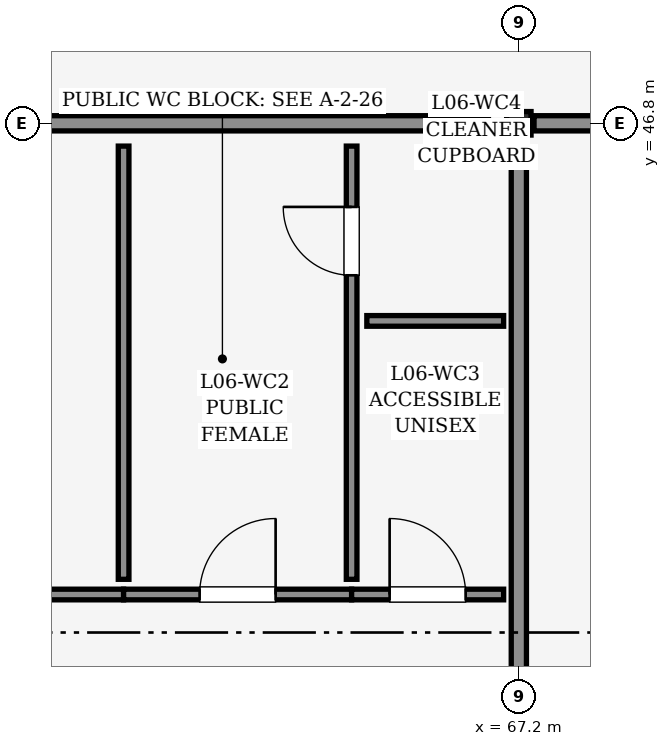
"""IFC4 building model, lengths in metres.
Left out: names, types, materials, properties, quantities, classifications, styles, units other than length and angle.
Written with IfcOpenShell. Run it as: python <this file> out.ifc"""

import sys

from ifc_helpers import new_model, si_unit, direction, frame, frame_2d, origin, origin_2d, place, context, subcontext, project, spatial, rectangle, i_section, extrude, element, fill, save


model = new_model("IFC4")
c1 = context("Model", 3, precision=1e-05, world=origin(), true_north=direction((0.0, 1.0)))
c2 = subcontext(c1, "Body", "Model", "MODEL_VIEW")
j1 = project(units=[si_unit("LENGTHUNIT", "METRE"), si_unit("PLANEANGLEUNIT", "RADIAN")], contexts=[c1])
p1 = place(None, origin())
s1 = spatial("IfcSite", under=j1, at=p1, CompositionType="ELEMENT")
p2 = place(p1, origin())
s2 = spatial("IfcBuilding", under=s1, at=p2, CompositionType="ELEMENT")
p3 = place(p2, frame((0.0, 0.0, 23.4)))
s3 = spatial("IfcBuildingStorey", under=s2, at=p3, CompositionType="ELEMENT", Elevation=23.4)
p4 = place(p3, frame((67.2, 46.8, 0.0), z_axis=(0.0, 0.0, 1.0), x_axis=(1.0, 0.0, 0.0)))
e1 = element("IfcColumn", 1, at=p4, inside=s3, PredefinedType="COLUMN", context=c2, shape_type="SweptSolid", body=[
    extrude(i_section(OverallWidth=0.309, OverallDepth=0.321, WebThickness=0.014, FlangeThickness=0.022, FilletRadius=0.015, at=origin_2d()), origin(), (0.0, 0.0, 1.0), 5.4),
])
p5 = place(p3, frame((59.2, 46.8, 0.0), z_axis=(0.0, 0.0, 1.0), x_axis=(1.0, 0.0, 0.0)))
e2 = element("IfcWall", 2, at=p5, inside=s3, PredefinedType="PARTITIONING", context=c2, shape_type="SweptSolid", body=[
    extrude(rectangle(XDim=7.6, YDim=0.2, at=frame_2d((3.8, 0.0))), origin(), (0.0, 0.0, 1.0), 3.785),
])
p6 = place(p3, frame((67.2, 38.8, 0.0), z_axis=(0.0, 0.0, 1.0), x_axis=(0.0, 1.0, 0.0)))
e3 = element("IfcWall", 3, at=p6, inside=s3, PredefinedType="PARTITIONING", context=c2, shape_type="SweptSolid", body=[
    extrude(rectangle(XDim=7.6, YDim=0.2, at=frame_2d((3.8, 0.0))), origin(), (0.0, 0.0, 1.0), 3.785),
])
p7 = place(p3, frame((59.0, 40.6, 0.0), z_axis=(0.0, 0.0, 1.0), x_axis=(1.0, 0.0, 0.0)))
e4 = element("IfcWall", 4, at=p7, inside=s3, PredefinedType="PARTITIONING", context=c2, shape_type="SweptSolid", body=[
    extrude(rectangle(XDim=3.0, YDim=0.14, at=frame_2d((1.5, 0.0))), origin(), (0.0, 0.0, 1.0), 3.785),
])
p8 = place(p7, frame((1.0, 0.0, 0.0)))
e5 = element("IfcOpeningElement", 5, at=p8, cuts=e4, PredefinedType="OPENING", context=c2, shape_type="SweptSolid", body=[
    extrude(rectangle(XDim=1.0, YDim=2.1, at=frame_2d((0.5, 1.05))), frame((0.0, 0.08, 0.0), z_axis=(0.0, -1.0, 0.0), x_axis=(1.0, 0.0, 0.0)), (0.0, 0.0, 1.0), 0.16),
])
p9 = place(p3, frame((62.0, 40.6, 0.0), z_axis=(0.0, 0.0, 1.0), x_axis=(1.0, 0.0, 0.0)))
e6 = element("IfcWall", 6, at=p9, inside=s3, PredefinedType="PARTITIONING", context=c2, shape_type="SweptSolid", body=[
    extrude(rectangle(XDim=3.0, YDim=0.14, at=frame_2d((1.5, 0.0))), origin(), (0.0, 0.0, 1.0), 3.785),
])
p10 = place(p9, frame((1.0, 0.0, 0.0)))
e7 = element("IfcOpeningElement", 7, at=p10, cuts=e6, PredefinedType="OPENING", context=c2, shape_type="SweptSolid", body=[
    extrude(rectangle(XDim=1.0, YDim=2.1, at=frame_2d((0.5, 1.05))), frame((0.0, 0.08, 0.0), z_axis=(0.0, -1.0, 0.0), x_axis=(1.0, 0.0, 0.0)), (0.0, 0.0, 1.0), 0.16),
])
p11 = place(p3, frame((65.0, 40.6, 0.0), z_axis=(0.0, 0.0, 1.0), x_axis=(1.0, 0.0, 0.0)))
e8 = element("IfcWall", 8, at=p11, inside=s3, PredefinedType="PARTITIONING", context=c2, shape_type="SweptSolid", body=[
    extrude(rectangle(XDim=2.0, YDim=0.14, at=frame_2d((1.0, 0.0))), origin(), (0.0, 0.0, 1.0), 3.785),
])
p12 = place(p11, frame((0.5, 0.0, 0.0)))
e9 = element("IfcOpeningElement", 9, at=p12, cuts=e8, PredefinedType="OPENING", context=c2, shape_type="SweptSolid", body=[
    extrude(rectangle(XDim=1.0, YDim=2.1, at=frame_2d((0.5, 1.05))), frame((0.0, 0.08, 0.0), z_axis=(0.0, -1.0, 0.0), x_axis=(1.0, 0.0, 0.0)), (0.0, 0.0, 1.0), 0.16),
])
p13 = place(p3, frame((62.0, 40.8, 0.0), z_axis=(0.0, 0.0, 1.0), x_axis=(0.0, 1.0, 0.0)))
e10 = element("IfcWall", 10, at=p13, inside=s3, PredefinedType="PARTITIONING", context=c2, shape_type="SweptSolid", body=[
    extrude(rectangle(XDim=5.7, YDim=0.14, at=frame_2d((2.85, 0.0))), origin(), (0.0, 0.0, 1.0), 3.785),
])
p14 = place(p3, frame((65.0, 40.8, 0.0), z_axis=(0.0, 0.0, 1.0), x_axis=(0.0, 1.0, 0.0)))
e11 = element("IfcWall", 11, at=p14, inside=s3, PredefinedType="PARTITIONING", context=c2, shape_type="SweptSolid", body=[
    extrude(rectangle(XDim=5.7, YDim=0.14, at=frame_2d((2.85, 0.0))), origin(), (0.0, 0.0, 1.0), 3.785),
])
p15 = place(p14, frame((4.0, 0.0, 0.0)))
e12 = element("IfcOpeningElement", 12, at=p15, cuts=e11, PredefinedType="OPENING", context=c2, shape_type="SweptSolid", body=[
    extrude(rectangle(XDim=0.9, YDim=2.05, at=frame_2d((0.45, 1.025))), frame((0.0, 0.08, 0.0), z_axis=(0.0, -1.0, 0.0), x_axis=(1.0, 0.0, 0.0)), (0.0, 0.0, 1.0), 0.16),
])
p16 = place(p3, frame((65.2, 44.2, 0.0), z_axis=(0.0, 0.0, 1.0), x_axis=(1.0, 0.0, 0.0)))
e13 = element("IfcWall", 13, at=p16, inside=s3, PredefinedType="PARTITIONING", context=c2, shape_type="SweptSolid", body=[
    extrude(rectangle(XDim=1.8, YDim=0.14, at=frame_2d((0.9, 0.0))), origin(), (0.0, 0.0, 1.0), 3.785),
])
p17 = place(p3, frame((67.4, 46.8, 0.0), z_axis=(0.0, 0.0, 1.0), x_axis=(1.0, 0.0, 0.0)))
e14 = element("IfcWall", 14, at=p17, inside=s3, PredefinedType="PARTITIONING", context=c2, shape_type="SweptSolid", body=[
    extrude(rectangle(XDim=7.8, YDim=0.2, at=frame_2d((3.9, 0.0))), origin(), (0.0, 0.0, 1.0), 3.785),
])
p18 = place(p10, origin())
e15 = element("IfcDoor", 15, at=p18, inside=s3, OperationType="SINGLE_SWING_RIGHT", PredefinedType="DOOR", context=c2, shape_type="SweptSolid", body=[
    extrude(rectangle(XDim=1.0, YDim=2.1, at=frame_2d((0.5, 1.05))), frame((0.0, 0.025, 0.0), z_axis=(0.0, -1.0, 0.0), x_axis=(1.0, 0.0, 0.0)), (0.0, 0.0, 1.0), 0.05),
])
fill(e7, e15)
p19 = place(p12, origin())
e16 = element("IfcDoor", 16, at=p19, inside=s3, OperationType="SINGLE_SWING_LEFT", PredefinedType="DOOR", context=c2, shape_type="SweptSolid", body=[
    extrude(rectangle(XDim=1.0, YDim=2.1, at=frame_2d((0.5, 1.05))), frame((0.0, 0.025, 0.0), z_axis=(0.0, -1.0, 0.0), x_axis=(1.0, 0.0, 0.0)), (0.0, 0.0, 1.0), 0.05),
])
fill(e9, e16)
p20 = place(p15, origin())
e17 = element("IfcDoor", 17, at=p20, inside=s3, OperationType="SINGLE_SWING_RIGHT", PredefinedType="DOOR", context=c2, shape_type="SweptSolid", body=[
    extrude(rectangle(XDim=0.9, YDim=2.05, at=frame_2d((0.45, 1.025))), frame((0.0, 0.025, 0.0), z_axis=(0.0, -1.0, 0.0), x_axis=(1.0, 0.0, 0.0)), (0.0, 0.0, 1.0), 0.05),
])
fill(e12, e17)
save(model, sys.argv[1])
